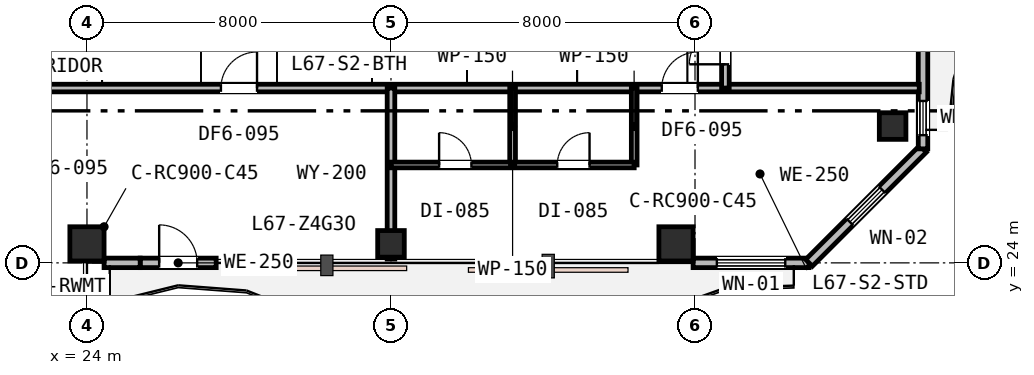
"""IFC4 building model, lengths in metres.
Left out: names, types, materials, properties, quantities, classifications, styles, units other than length and angle.
Written with IfcOpenShell. Run it as: python <this file> out.ifc"""

import sys

from ifc_helpers import new_model, si_unit, direction, frame, frame_2d, origin, origin_2d, place, context, subcontext, project, spatial, rectangle, extrude, element, fill, save


model = new_model("IFC4")
c1 = context("Model", 3, precision=1e-05, world=origin(), true_north=direction((0.0, 1.0)))
c2 = subcontext(c1, "Body", "Model", "MODEL_VIEW")
j1 = project(units=[si_unit("LENGTHUNIT", "METRE"), si_unit("PLANEANGLEUNIT", "RADIAN")], contexts=[c1])
p1 = place(None, origin())
s1 = spatial("IfcSite", under=j1, at=p1, CompositionType="ELEMENT")
p2 = place(p1, origin())
s2 = spatial("IfcBuilding", under=s1, at=p2, CompositionType="ELEMENT")
p3 = place(p2, frame((0.0, 0.0, 260.2)))
s3 = spatial("IfcBuildingStorey", under=s2, at=p3, CompositionType="ELEMENT", Elevation=260.2)
p4 = place(p3, frame((24.0, 24.5, 0.0), z_axis=(0.0, 0.0, 1.0), x_axis=(1.0, 0.0, 0.0)))
e1 = element("IfcColumn", 1, at=p4, inside=s3, PredefinedType="COLUMN", context=c2, shape_type="SweptSolid", body=[
    extrude(rectangle(XDim=0.9, YDim=0.9, at=origin_2d()), origin(), (0.0, 0.0, 1.0), 3.8),
])
p5 = place(p3, frame((32.0, 24.5, 0.0), z_axis=(0.0, 0.0, 1.0), x_axis=(1.0, 0.0, 0.0)))
e2 = element("IfcColumn", 2, at=p5, inside=s3, PredefinedType="COLUMN", context=c2, shape_type="SweptSolid", body=[
    extrude(rectangle(XDim=0.7, YDim=0.7, at=origin_2d()), origin(), (0.0, 0.0, 1.0), 3.8),
])
p6 = place(p3, frame((39.5, 24.5, 0.0), z_axis=(0.0, 0.0, 1.0), x_axis=(1.0, 0.0, 0.0)))
e3 = element("IfcColumn", 3, at=p6, inside=s3, PredefinedType="COLUMN", context=c2, shape_type="SweptSolid", body=[
    extrude(rectangle(XDim=0.9, YDim=0.9, at=origin_2d()), origin(), (0.0, 0.0, 1.0), 3.8),
])
p7 = place(p3, frame((45.2, 27.6, 0.0), z_axis=(0.0, 0.0, 1.0), x_axis=(1.0, 0.0, 0.0)))
e4 = element("IfcColumn", 4, at=p7, inside=s3, PredefinedType="COLUMN", context=c2, shape_type="SweptSolid", body=[
    extrude(rectangle(XDim=0.7, YDim=0.7, at=origin_2d()), origin(), (0.0, 0.0, 1.0), 3.8),
])
p8 = place(p3, frame((25.4, 24.0, 0.0), z_axis=(0.0, 0.0, 1.0), x_axis=(1.0, 0.0, 0.0)))
e5 = element("IfcWall", 5, at=p8, inside=s3, PredefinedType="STANDARD", context=c2, shape_type="SweptSolid", body=[
    extrude(rectangle(XDim=2.0, YDim=0.25, at=frame_2d((1.0, 0.0))), origin(), (0.0, 0.0, 1.0), 3.27),
])
p9 = place(p8, frame((0.5, 0.0, 0.0)))
e6 = element("IfcOpeningElement", 6, at=p9, cuts=e5, PredefinedType="OPENING", context=c2, shape_type="SweptSolid", body=[
    extrude(rectangle(XDim=1.0, YDim=2.15, at=frame_2d((0.5, 1.075))), frame((0.0, 0.135, 0.0), z_axis=(0.0, -1.0, 0.0), x_axis=(1.0, 0.0, 0.0)), (0.0, 0.0, 1.0), 0.27),
])
p10 = place(p3, frame((24.45, 24.0, 0.0), z_axis=(0.0, 0.0, 1.0), x_axis=(1.0, 0.0, 0.0)))
e7 = element("IfcWall", 7, at=p10, inside=s3, PredefinedType="STANDARD", context=c2, shape_type="SweptSolid", body=[
    extrude(rectangle(XDim=0.95, YDim=0.25, at=frame_2d((0.475, 0.0))), origin(), (0.0, 0.0, 1.0), 3.27),
])
p11 = place(p3, frame((39.95, 24.0, 0.0), z_axis=(0.0, 0.0, 1.0), x_axis=(1.0, 0.0, 0.0)))
e8 = element("IfcWall", 8, at=p11, inside=s3, PredefinedType="STANDARD", context=c2, shape_type="SweptSolid", body=[
    extrude(rectangle(XDim=3.05, YDim=0.25, at=frame_2d((1.525, 0.0))), origin(), (0.0, 0.0, 1.0), 3.53),
])
p12 = place(p11, frame((0.625, 0.0, 0.75)))
e9 = element("IfcOpeningElement", 9, at=p12, cuts=e8, PredefinedType="OPENING", context=c2, shape_type="SweptSolid", body=[
    extrude(rectangle(XDim=1.8, YDim=1.85, at=frame_2d((0.9, 0.925))), frame((0.0, 0.135, 0.0), z_axis=(0.0, -1.0, 0.0), x_axis=(1.0, 0.0, 0.0)), (0.0, 0.0, 1.0), 0.27),
])
p13 = place(p3, frame((43.0, 24.0, 0.0), z_axis=(0.0, 0.0, 1.0), x_axis=(0.707106781187, 0.707106781187, 0.0)))
e10 = element("IfcWall", 10, at=p13, inside=s3, PredefinedType="STANDARD", context=c2, shape_type="SweptSolid", body=[
    extrude(rectangle(XDim=4.243, YDim=0.25, at=frame_2d((2.121, 0.0))), origin(), (0.0, 0.0, 1.0), 3.53),
])
p14 = place(p13, frame((1.521, 0.0, 0.85)))
e11 = element("IfcOpeningElement", 11, at=p14, cuts=e10, PredefinedType="OPENING", context=c2, shape_type="SweptSolid", body=[
    extrude(rectangle(XDim=1.2, YDim=1.6, at=frame_2d((0.6, 0.8))), frame((0.0, 0.135, 0.0), z_axis=(0.0, -1.0, 0.0), x_axis=(1.0, 0.0, 0.0)), (0.0, 0.0, 1.0), 0.27),
])
p15 = place(p3, frame((46.0, 27.0, 0.0), z_axis=(0.0, 0.0, 1.0), x_axis=(0.0, 1.0, 0.0)))
e12 = element("IfcWall", 12, at=p15, inside=s3, PredefinedType="STANDARD", context=c2, shape_type="SweptSolid", body=[
    extrude(rectangle(XDim=2.9, YDim=0.25, at=frame_2d((1.45, 0.0))), origin(), (0.0, 0.0, 1.0), 3.53),
])
p16 = place(p15, frame((0.36, 0.0, 0.9)))
e13 = element("IfcOpeningElement", 13, at=p16, cuts=e12, PredefinedType="OPENING", context=c2, shape_type="SweptSolid", body=[
    extrude(rectangle(XDim=0.9, YDim=1.55, at=frame_2d((0.45, 0.775))), frame((0.0, 0.135, 0.0), z_axis=(0.0, -1.0, 0.0), x_axis=(1.0, 0.0, 0.0)), (0.0, 0.0, 1.0), 0.27),
])
p17 = place(p3, frame((21.6, 28.6, 0.0), z_axis=(0.0, 0.0, 1.0), x_axis=(1.0, 0.0, 0.0)))
e14 = element("IfcWall", 14, at=p17, inside=s3, PredefinedType="PARTITIONING", context=c2, shape_type="SweptSolid", body=[
    extrude(rectangle(XDim=24.3, YDim=0.2, at=frame_2d((12.15, 0.0))), origin(), (0.0, 0.0, 1.0), 3.16),
])
p18 = place(p17, frame((5.925, 0.0, 0.0)))
e15 = element("IfcOpeningElement", 15, at=p18, cuts=e14, PredefinedType="OPENING", context=c2, shape_type="SweptSolid", body=[
    extrude(rectangle(XDim=0.95, YDim=2.15, at=frame_2d((0.475, 1.075))), frame((0.0, 0.11, 0.0), z_axis=(0.0, -1.0, 0.0), x_axis=(1.0, 0.0, 0.0)), (0.0, 0.0, 1.0), 0.22),
])
p19 = place(p17, frame((17.525, 0.0, 0.0)))
e16 = element("IfcOpeningElement", 16, at=p19, cuts=e14, PredefinedType="OPENING", context=c2, shape_type="SweptSolid", body=[
    extrude(rectangle(XDim=0.95, YDim=2.15, at=frame_2d((0.475, 1.075))), frame((0.0, 0.11, 0.0), z_axis=(0.0, -1.0, 0.0), x_axis=(1.0, 0.0, 0.0)), (0.0, 0.0, 1.0), 0.22),
])
p20 = place(p3, frame((40.8, 28.6, 0.0), z_axis=(0.0, 0.0, 1.0), x_axis=(0.0, 1.0, 0.0)))
e17 = element("IfcWall", 17, at=p20, inside=s3, PredefinedType="PARTITIONING", context=c2, shape_type="SweptSolid", body=[
    extrude(rectangle(XDim=14.3, YDim=0.2, at=frame_2d((7.15, 0.0))), origin(), (0.0, 0.0, 1.0), 3.16),
])
p21 = place(p20, frame((0.625, 0.0, 0.0)))
e18 = element("IfcOpeningElement", 18, at=p21, cuts=e17, PredefinedType="OPENING", context=c2, shape_type="SweptSolid", body=[
    extrude(rectangle(XDim=0.95, YDim=2.15, at=frame_2d((0.475, 1.075))), frame((0.0, 0.11, 0.0), z_axis=(0.0, -1.0, 0.0), x_axis=(1.0, 0.0, 0.0)), (0.0, 0.0, 1.0), 0.22),
])
p22 = place(p3, frame((32.0, 24.1, 0.0), z_axis=(0.0, 0.0, 1.0), x_axis=(0.0, 1.0, 0.0)))
e19 = element("IfcWall", 19, at=p22, inside=s3, PredefinedType="PARTITIONING", context=c2, shape_type="SweptSolid", body=[
    extrude(rectangle(XDim=4.5, YDim=0.2, at=frame_2d((2.25, 0.0))), origin(), (0.0, 0.0, 1.0), 3.16),
])
for number, where, z_axis, x_axis in (
    (20, (38.4, 26.576, 0.0), (0.0, 0.0, 1.0), (0.0, 1.0, 0.0)),
    (21, (35.2, 26.576, 0.0), (0.0, 0.0, 1.0), (0.0, 1.0, 0.0)),
):
    element("IfcWall", number, at=place(p3, frame(where, z_axis=z_axis, x_axis=x_axis)), inside=s3, PredefinedType="PARTITIONING", context=c2, shape_type="SweptSolid", body=[
        extrude(rectangle(XDim=2.024, YDim=0.15, at=frame_2d((1.012, 0.0))), origin(), (0.0, 0.0, 1.0), 3.53),
    ])
p23 = place(p3, frame((32.0, 26.576, 0.0), z_axis=(0.0, 0.0, 1.0), x_axis=(1.0, 0.0, 0.0)))
e22 = element("IfcWall", 22, at=p23, inside=s3, PredefinedType="PARTITIONING", context=c2, shape_type="SweptSolid", body=[
    extrude(rectangle(XDim=6.4, YDim=0.15, at=frame_2d((3.2, 0.0))), origin(), (0.0, 0.0, 1.0), 3.16),
])
p24 = place(p23, frame((1.266, 0.0, 0.0)))
e23 = element("IfcOpeningElement", 23, at=p24, cuts=e22, PredefinedType="OPENING", context=c2, shape_type="SweptSolid", body=[
    extrude(rectangle(XDim=0.85, YDim=2.15, at=frame_2d((0.425, 1.075))), frame((0.0, 0.085, 0.0), z_axis=(0.0, -1.0, 0.0), x_axis=(1.0, 0.0, 0.0)), (0.0, 0.0, 1.0), 0.17),
])
p25 = place(p23, frame((4.375, 0.0, 0.0)))
e24 = element("IfcOpeningElement", 24, at=p25, cuts=e22, PredefinedType="OPENING", context=c2, shape_type="SweptSolid", body=[
    extrude(rectangle(XDim=0.85, YDim=2.15, at=frame_2d((0.425, 1.075))), frame((0.0, 0.085, 0.0), z_axis=(0.0, -1.0, 0.0), x_axis=(1.0, 0.0, 0.0)), (0.0, 0.0, 1.0), 0.17),
])
p26 = place(p9, origin())
e25 = element("IfcDoor", 25, at=p26, inside=s3, OperationType="SINGLE_SWING_LEFT", PredefinedType="DOOR", context=c2, shape_type="SweptSolid", body=[
    extrude(rectangle(XDim=1.0, YDim=2.15, at=frame_2d((0.5, 1.075))), frame((0.0, 0.025, 0.0), z_axis=(0.0, -1.0, 0.0), x_axis=(1.0, 0.0, 0.0)), (0.0, 0.0, 1.0), 0.05),
])
fill(e6, e25)
p27 = place(p12, origin())
e26 = element("IfcWindow", 26, at=p27, inside=s3, PartitioningType="SINGLE_PANEL", PredefinedType="WINDOW", context=c2, shape_type="SweptSolid", body=[
    extrude(rectangle(XDim=1.8, YDim=1.85, at=frame_2d((0.9, 0.925))), frame((0.0, 0.03, 0.0), z_axis=(0.0, -1.0, 0.0), x_axis=(1.0, 0.0, 0.0)), (0.0, 0.0, 1.0), 0.06),
])
fill(e9, e26)
p28 = place(p14, origin())
e27 = element("IfcWindow", 27, at=p28, inside=s3, PartitioningType="SINGLE_PANEL", PredefinedType="WINDOW", context=c2, shape_type="SweptSolid", body=[
    extrude(rectangle(XDim=1.2, YDim=1.6, at=frame_2d((0.6, 0.8))), frame((0.0, 0.03, 0.0), z_axis=(0.0, -1.0, 0.0), x_axis=(1.0, 0.0, 0.0)), (0.0, 0.0, 1.0), 0.06),
])
fill(e11, e27)
p29 = place(p16, origin())
e28 = element("IfcWindow", 28, at=p29, inside=s3, PartitioningType="SINGLE_PANEL", PredefinedType="WINDOW", context=c2, shape_type="SweptSolid", body=[
    extrude(rectangle(XDim=0.9, YDim=1.55, at=frame_2d((0.45, 0.775))), frame((0.0, 0.03, 0.0), z_axis=(0.0, -1.0, 0.0), x_axis=(1.0, 0.0, 0.0)), (0.0, 0.0, 1.0), 0.06),
])
fill(e13, e28)
p30 = place(p21, origin())
e29 = element("IfcDoor", 29, at=p30, inside=s3, OperationType="SINGLE_SWING_LEFT", PredefinedType="DOOR", context=c2, shape_type="SweptSolid", body=[
    extrude(rectangle(XDim=0.95, YDim=2.15, at=frame_2d((0.475, 1.075))), frame((0.0, 0.025, 0.0), z_axis=(0.0, -1.0, 0.0), x_axis=(1.0, 0.0, 0.0)), (0.0, 0.0, 1.0), 0.05),
])
fill(e18, e29)
p31 = place(p18, origin())
e30 = element("IfcDoor", 30, at=p31, inside=s3, OperationType="SINGLE_SWING_RIGHT", PredefinedType="DOOR", context=c2, shape_type="SweptSolid", body=[
    extrude(rectangle(XDim=0.95, YDim=2.15, at=frame_2d((0.475, 1.075))), frame((0.0, 0.025, 0.0), z_axis=(0.0, -1.0, 0.0), x_axis=(1.0, 0.0, 0.0)), (0.0, 0.0, 1.0), 0.05),
])
fill(e15, e30)
p32 = place(p19, origin())
e31 = element("IfcDoor", 31, at=p32, inside=s3, OperationType="SINGLE_SWING_RIGHT", PredefinedType="DOOR", context=c2, shape_type="SweptSolid", body=[
    extrude(rectangle(XDim=0.95, YDim=2.15, at=frame_2d((0.475, 1.075))), frame((0.0, 0.025, 0.0), z_axis=(0.0, -1.0, 0.0), x_axis=(1.0, 0.0, 0.0)), (0.0, 0.0, 1.0), 0.05),
])
fill(e16, e31)
p33 = place(p24, origin())
e32 = element("IfcDoor", 32, at=p33, inside=s3, OperationType="SINGLE_SWING_LEFT", PredefinedType="DOOR", context=c2, shape_type="SweptSolid", body=[
    extrude(rectangle(XDim=0.85, YDim=2.15, at=frame_2d((0.425, 1.075))), frame((0.0, 0.025, 0.0), z_axis=(0.0, -1.0, 0.0), x_axis=(1.0, 0.0, 0.0)), (0.0, 0.0, 1.0), 0.05),
])
fill(e23, e32)
p34 = place(p25, origin())
e33 = element("IfcDoor", 33, at=p34, inside=s3, OperationType="SINGLE_SWING_RIGHT", PredefinedType="DOOR", context=c2, shape_type="SweptSolid", body=[
    extrude(rectangle(XDim=0.85, YDim=2.15, at=frame_2d((0.425, 1.075))), frame((0.0, 0.025, 0.0), z_axis=(0.0, -1.0, 0.0), x_axis=(1.0, 0.0, 0.0)), (0.0, 0.0, 1.0), 0.05),
])
fill(e24, e33)
save(model, sys.argv[1])
